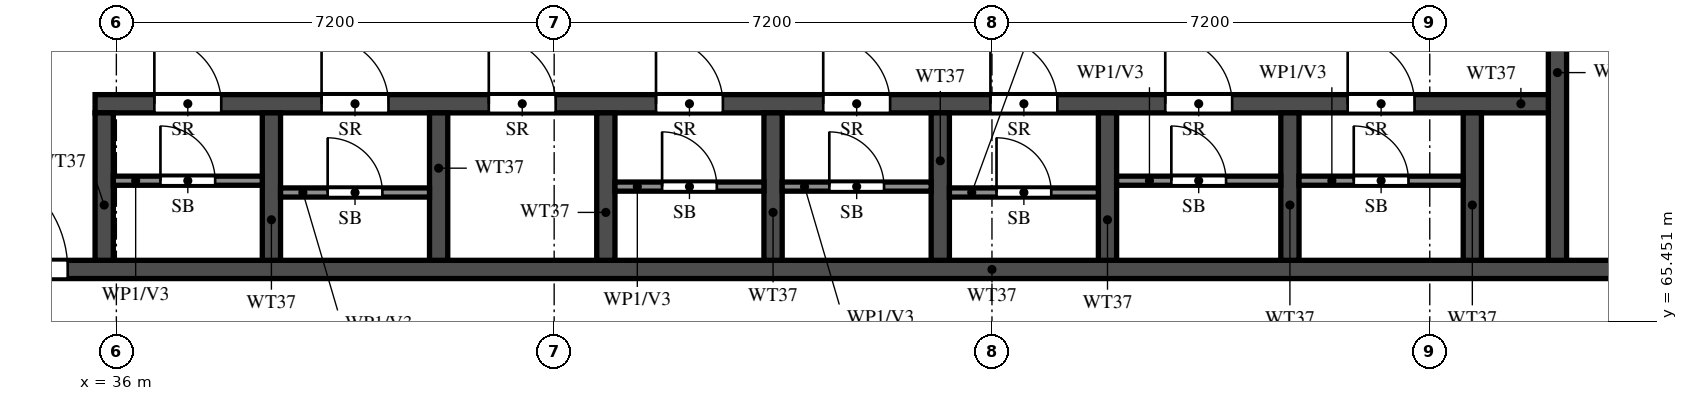
"""IFC4 building model, lengths in metres.
Left out: names, types, materials, properties, quantities, classifications, styles, units other than length and angle.
Written with IfcOpenShell. Run it as: python <this file> out.ifc"""

import sys

from ifc_helpers import new_model, si_unit, direction, frame, frame_2d, origin, place, context, subcontext, project, spatial, rectangle, extrude, element, fill, save


model = new_model("IFC4")
c1 = context("Model", 3, precision=1e-05, world=origin(), true_north=direction((0.0, 1.0)))
c2 = subcontext(c1, "Body", "Model", "MODEL_VIEW")
j1 = project(units=[si_unit("LENGTHUNIT", "METRE"), si_unit("PLANEANGLEUNIT", "RADIAN")], contexts=[c1])
p1 = place(None, origin())
s1 = spatial("IfcSite", under=j1, at=p1, CompositionType="ELEMENT")
p2 = place(p1, origin())
s2 = spatial("IfcBuilding", under=s1, at=p2, CompositionType="ELEMENT")
p3 = place(p2, frame((0.0, 0.0, 236.0)))
s3 = spatial("IfcBuildingStorey", under=s2, at=p3, CompositionType="ELEMENT", Elevation=236.0)
p4 = place(p3, frame((29.2, 66.3, 0.0), z_axis=(0.0, 0.0, 1.0), x_axis=(1.0, 0.0, 0.0)))
e1 = element("IfcWall", 1, at=p4, inside=s3, PredefinedType="SHEAR", context=c2, shape_type="SweptSolid", body=[
    extrude(rectangle(XDim=42.4, YDim=0.3, at=frame_2d((21.2, 0.0))), origin(), (0.0, 0.0, 1.0), 3.22),
])
p5 = place(p4, frame((1.425, 0.0, 0.0)))
e2 = element("IfcOpeningElement", 2, at=p5, cuts=e1, PredefinedType="OPENING", context=c2, shape_type="SweptSolid", body=[
    extrude(rectangle(XDim=1.1, YDim=2.1, at=frame_2d((0.55, 1.05))), frame((0.0, 0.16, 0.0), z_axis=(0.0, -1.0, 0.0), x_axis=(1.0, 0.0, 0.0)), (0.0, 0.0, 1.0), 0.32),
])
p6 = place(p4, frame((4.2, 0.0, 0.0)))
e3 = element("IfcOpeningElement", 3, at=p6, cuts=e1, PredefinedType="OPENING", context=c2, shape_type="SweptSolid", body=[
    extrude(rectangle(XDim=1.8, YDim=2.1, at=frame_2d((0.9, 1.05))), frame((0.0, 0.16, 0.0), z_axis=(0.0, -1.0, 0.0), x_axis=(1.0, 0.0, 0.0)), (0.0, 0.0, 1.0), 0.32),
])
p7 = place(p3, frame((35.65, 69.025, 0.0), z_axis=(0.0, 0.0, 1.0), x_axis=(1.0, 0.0, 0.0)))
e4 = element("IfcWall", 4, at=p7, inside=s3, PredefinedType="SHEAR", context=c2, shape_type="SweptSolid", body=[
    extrude(rectangle(XDim=24.05, YDim=0.3, at=frame_2d((12.025, 0.0))), origin(), (0.0, 0.0, 1.0), 3.22),
])
p8 = place(p7, frame((0.975, 0.0, 0.0)))
e5 = element("IfcOpeningElement", 5, at=p8, cuts=e4, PredefinedType="OPENING", context=c2, shape_type="SweptSolid", body=[
    extrude(rectangle(XDim=1.1, YDim=2.1, at=frame_2d((0.55, 1.05))), frame((0.0, 0.16, 0.0), z_axis=(0.0, -1.0, 0.0), x_axis=(1.0, 0.0, 0.0)), (0.0, 0.0, 1.0), 0.32),
])
p9 = place(p7, frame((3.725, 0.0, 0.0)))
e6 = element("IfcOpeningElement", 6, at=p9, cuts=e4, PredefinedType="OPENING", context=c2, shape_type="SweptSolid", body=[
    extrude(rectangle(XDim=1.1, YDim=2.1, at=frame_2d((0.55, 1.05))), frame((0.0, 0.16, 0.0), z_axis=(0.0, -1.0, 0.0), x_axis=(1.0, 0.0, 0.0)), (0.0, 0.0, 1.0), 0.32),
])
p10 = place(p7, frame((6.475, 0.0, 0.0)))
e7 = element("IfcOpeningElement", 7, at=p10, cuts=e4, PredefinedType="OPENING", context=c2, shape_type="SweptSolid", body=[
    extrude(rectangle(XDim=1.1, YDim=2.1, at=frame_2d((0.55, 1.05))), frame((0.0, 0.16, 0.0), z_axis=(0.0, -1.0, 0.0), x_axis=(1.0, 0.0, 0.0)), (0.0, 0.0, 1.0), 0.32),
])
p11 = place(p7, frame((9.225, 0.0, 0.0)))
e8 = element("IfcOpeningElement", 8, at=p11, cuts=e4, PredefinedType="OPENING", context=c2, shape_type="SweptSolid", body=[
    extrude(rectangle(XDim=1.1, YDim=2.1, at=frame_2d((0.55, 1.05))), frame((0.0, 0.16, 0.0), z_axis=(0.0, -1.0, 0.0), x_axis=(1.0, 0.0, 0.0)), (0.0, 0.0, 1.0), 0.32),
])
p12 = place(p7, frame((11.975, 0.0, 0.0)))
e9 = element("IfcOpeningElement", 9, at=p12, cuts=e4, PredefinedType="OPENING", context=c2, shape_type="SweptSolid", body=[
    extrude(rectangle(XDim=1.1, YDim=2.1, at=frame_2d((0.55, 1.05))), frame((0.0, 0.16, 0.0), z_axis=(0.0, -1.0, 0.0), x_axis=(1.0, 0.0, 0.0)), (0.0, 0.0, 1.0), 0.32),
])
p13 = place(p7, frame((14.725, 0.0, 0.0)))
e10 = element("IfcOpeningElement", 10, at=p13, cuts=e4, PredefinedType="OPENING", context=c2, shape_type="SweptSolid", body=[
    extrude(rectangle(XDim=1.1, YDim=2.1, at=frame_2d((0.55, 1.05))), frame((0.0, 0.16, 0.0), z_axis=(0.0, -1.0, 0.0), x_axis=(1.0, 0.0, 0.0)), (0.0, 0.0, 1.0), 0.32),
])
p14 = place(p7, frame((17.6, 0.0, 0.0)))
e11 = element("IfcOpeningElement", 11, at=p14, cuts=e4, PredefinedType="OPENING", context=c2, shape_type="SweptSolid", body=[
    extrude(rectangle(XDim=1.1, YDim=2.1, at=frame_2d((0.55, 1.05))), frame((0.0, 0.16, 0.0), z_axis=(0.0, -1.0, 0.0), x_axis=(1.0, 0.0, 0.0)), (0.0, 0.0, 1.0), 0.32),
])
p15 = place(p7, frame((20.6, 0.0, 0.0)))
e12 = element("IfcOpeningElement", 12, at=p15, cuts=e4, PredefinedType="OPENING", context=c2, shape_type="SweptSolid", body=[
    extrude(rectangle(XDim=1.1, YDim=2.1, at=frame_2d((0.55, 1.05))), frame((0.0, 0.16, 0.0), z_axis=(0.0, -1.0, 0.0), x_axis=(1.0, 0.0, 0.0)), (0.0, 0.0, 1.0), 0.32),
])
p16 = place(p3, frame((59.7, 66.45, 0.0), z_axis=(0.0, 0.0, 1.0), x_axis=(0.0, 1.0, 0.0)))
e13 = element("IfcWall", 13, at=p16, inside=s3, PredefinedType="SHEAR", context=c2, shape_type="SweptSolid", body=[
    extrude(rectangle(XDim=6.175, YDim=0.3, at=frame_2d((3.087, 0.0))), origin(), (0.0, 0.0, 1.0), 3.22),
])
p17 = place(p16, frame((3.85, 0.0, 0.0)))
e14 = element("IfcOpeningElement", 14, at=p17, cuts=e13, PredefinedType="OPENING", context=c2, shape_type="SweptSolid", body=[
    extrude(rectangle(XDim=1.2, YDim=2.1, at=frame_2d((0.6, 1.05))), frame((0.0, 0.16, 0.0), z_axis=(0.0, -1.0, 0.0), x_axis=(1.0, 0.0, 0.0)), (0.0, 0.0, 1.0), 0.32),
])
for number, where, z_axis, x_axis in (
    (15, (35.8, 66.45, 0.0), (0.0, 0.0, 1.0), (0.0, 1.0, 0.0)),
    (16, (38.55, 66.45, 0.0), (0.0, 0.0, 1.0), (0.0, 1.0, 0.0)),
    (17, (41.3, 66.45, 0.0), (0.0, 0.0, 1.0), (0.0, 1.0, 0.0)),
    (18, (44.05, 66.45, 0.0), (0.0, 0.0, 1.0), (0.0, 1.0, 0.0)),
    (19, (46.8, 66.45, 0.0), (0.0, 0.0, 1.0), (0.0, 1.0, 0.0)),
    (20, (49.55, 66.45, 0.0), (0.0, 0.0, 1.0), (0.0, 1.0, 0.0)),
    (21, (52.3, 66.45, 0.0), (0.0, 0.0, 1.0), (0.0, 1.0, 0.0)),
    (22, (55.3, 66.45, 0.0), (0.0, 0.0, 1.0), (0.0, 1.0, 0.0)),
    (23, (58.3, 66.45, 0.0), (0.0, 0.0, 1.0), (0.0, 1.0, 0.0)),
):
    element("IfcWall", number, at=place(p3, frame(where, z_axis=z_axis, x_axis=x_axis)), inside=s3, PredefinedType="SHEAR", context=c2, shape_type="SweptSolid", body=[
        extrude(rectangle(XDim=2.425, YDim=0.3, at=frame_2d((1.212, 0.0))), origin(), (0.0, 0.0, 1.0), 3.22),
    ])
p18 = place(p3, frame((35.95, 67.76, 0.0), z_axis=(0.0, 0.0, 1.0), x_axis=(1.0, 0.0, 0.0)))
e24 = element("IfcWall", 24, at=p18, inside=s3, PredefinedType="PARTITIONING", context=c2, shape_type="SweptSolid", body=[
    extrude(rectangle(XDim=2.45, YDim=0.15, at=frame_2d((1.225, 0.0))), origin(), (0.0, 0.0, 1.0), 3.22),
])
p19 = place(p18, frame((0.775, 0.0, 0.0)))
e25 = element("IfcOpeningElement", 25, at=p19, cuts=e24, PredefinedType="OPENING", context=c2, shape_type="SweptSolid", body=[
    extrude(rectangle(XDim=0.9, YDim=2.1, at=frame_2d((0.45, 1.05))), frame((0.0, 0.085, 0.0), z_axis=(0.0, -1.0, 0.0), x_axis=(1.0, 0.0, 0.0)), (0.0, 0.0, 1.0), 0.17),
])
p20 = place(p3, frame((38.7, 67.565, 0.0), z_axis=(0.0, 0.0, 1.0), x_axis=(1.0, 0.0, 0.0)))
e26 = element("IfcWall", 26, at=p20, inside=s3, PredefinedType="PARTITIONING", context=c2, shape_type="SweptSolid", body=[
    extrude(rectangle(XDim=2.45, YDim=0.15, at=frame_2d((1.225, 0.0))), origin(), (0.0, 0.0, 1.0), 3.22),
])
p21 = place(p20, frame((0.775, 0.0, 0.0)))
e27 = element("IfcOpeningElement", 27, at=p21, cuts=e26, PredefinedType="OPENING", context=c2, shape_type="SweptSolid", body=[
    extrude(rectangle(XDim=0.9, YDim=2.1, at=frame_2d((0.45, 1.05))), frame((0.0, 0.085, 0.0), z_axis=(0.0, -1.0, 0.0), x_axis=(1.0, 0.0, 0.0)), (0.0, 0.0, 1.0), 0.17),
])
p22 = place(p3, frame((44.2, 67.663, 0.0), z_axis=(0.0, 0.0, 1.0), x_axis=(1.0, 0.0, 0.0)))
e28 = element("IfcWall", 28, at=p22, inside=s3, PredefinedType="PARTITIONING", context=c2, shape_type="SweptSolid", body=[
    extrude(rectangle(XDim=2.45, YDim=0.15, at=frame_2d((1.225, 0.0))), origin(), (0.0, 0.0, 1.0), 3.22),
])
p23 = place(p22, frame((0.775, 0.0, 0.0)))
e29 = element("IfcOpeningElement", 29, at=p23, cuts=e28, PredefinedType="OPENING", context=c2, shape_type="SweptSolid", body=[
    extrude(rectangle(XDim=0.9, YDim=2.1, at=frame_2d((0.45, 1.05))), frame((0.0, 0.085, 0.0), z_axis=(0.0, -1.0, 0.0), x_axis=(1.0, 0.0, 0.0)), (0.0, 0.0, 1.0), 0.17),
])
p24 = place(p3, frame((46.95, 67.663, 0.0), z_axis=(0.0, 0.0, 1.0), x_axis=(1.0, 0.0, 0.0)))
e30 = element("IfcWall", 30, at=p24, inside=s3, PredefinedType="PARTITIONING", context=c2, shape_type="SweptSolid", body=[
    extrude(rectangle(XDim=2.45, YDim=0.15, at=frame_2d((1.225, 0.0))), origin(), (0.0, 0.0, 1.0), 3.22),
])
p25 = place(p24, frame((0.775, 0.0, 0.0)))
e31 = element("IfcOpeningElement", 31, at=p25, cuts=e30, PredefinedType="OPENING", context=c2, shape_type="SweptSolid", body=[
    extrude(rectangle(XDim=0.9, YDim=2.1, at=frame_2d((0.45, 1.05))), frame((0.0, 0.085, 0.0), z_axis=(0.0, -1.0, 0.0), x_axis=(1.0, 0.0, 0.0)), (0.0, 0.0, 1.0), 0.17),
])
p26 = place(p3, frame((49.7, 67.565, 0.0), z_axis=(0.0, 0.0, 1.0), x_axis=(1.0, 0.0, 0.0)))
e32 = element("IfcWall", 32, at=p26, inside=s3, PredefinedType="PARTITIONING", context=c2, shape_type="SweptSolid", body=[
    extrude(rectangle(XDim=2.45, YDim=0.15, at=frame_2d((1.225, 0.0))), origin(), (0.0, 0.0, 1.0), 3.22),
])
p27 = place(p26, frame((0.775, 0.0, 0.0)))
e33 = element("IfcOpeningElement", 33, at=p27, cuts=e32, PredefinedType="OPENING", context=c2, shape_type="SweptSolid", body=[
    extrude(rectangle(XDim=0.9, YDim=2.1, at=frame_2d((0.45, 1.05))), frame((0.0, 0.085, 0.0), z_axis=(0.0, -1.0, 0.0), x_axis=(1.0, 0.0, 0.0)), (0.0, 0.0, 1.0), 0.17),
])
p28 = place(p3, frame((52.45, 67.76, 0.0), z_axis=(0.0, 0.0, 1.0), x_axis=(1.0, 0.0, 0.0)))
e34 = element("IfcWall", 34, at=p28, inside=s3, PredefinedType="PARTITIONING", context=c2, shape_type="SweptSolid", body=[
    extrude(rectangle(XDim=2.7, YDim=0.15, at=frame_2d((1.35, 0.0))), origin(), (0.0, 0.0, 1.0), 3.22),
])
p29 = place(p28, frame((0.9, 0.0, 0.0)))
e35 = element("IfcOpeningElement", 35, at=p29, cuts=e34, PredefinedType="OPENING", context=c2, shape_type="SweptSolid", body=[
    extrude(rectangle(XDim=0.9, YDim=2.1, at=frame_2d((0.45, 1.05))), frame((0.0, 0.085, 0.0), z_axis=(0.0, -1.0, 0.0), x_axis=(1.0, 0.0, 0.0)), (0.0, 0.0, 1.0), 0.17),
])
p30 = place(p3, frame((55.45, 67.76, 0.0), z_axis=(0.0, 0.0, 1.0), x_axis=(1.0, 0.0, 0.0)))
e36 = element("IfcWall", 36, at=p30, inside=s3, PredefinedType="PARTITIONING", context=c2, shape_type="SweptSolid", body=[
    extrude(rectangle(XDim=2.7, YDim=0.15, at=frame_2d((1.35, 0.0))), origin(), (0.0, 0.0, 1.0), 3.22),
])
p31 = place(p30, frame((0.9, 0.0, 0.0)))
e37 = element("IfcOpeningElement", 37, at=p31, cuts=e36, PredefinedType="OPENING", context=c2, shape_type="SweptSolid", body=[
    extrude(rectangle(XDim=0.9, YDim=2.1, at=frame_2d((0.45, 1.05))), frame((0.0, 0.085, 0.0), z_axis=(0.0, -1.0, 0.0), x_axis=(1.0, 0.0, 0.0)), (0.0, 0.0, 1.0), 0.17),
])
p32 = place(p6, origin())
e38 = element("IfcDoor", 38, at=p32, inside=s3, OperationType="DOUBLE_DOOR_SINGLE_SWING", PredefinedType="DOOR", context=c2, shape_type="SweptSolid", body=[
    extrude(rectangle(XDim=1.8, YDim=2.1, at=frame_2d((0.9, 1.05))), frame((0.0, 0.025, 0.0), z_axis=(0.0, -1.0, 0.0), x_axis=(1.0, 0.0, 0.0)), (0.0, 0.0, 1.0), 0.05),
])
fill(e3, e38)
p33 = place(p8, origin())
e39 = element("IfcDoor", 39, at=p33, inside=s3, OperationType="SINGLE_SWING_RIGHT", PredefinedType="DOOR", context=c2, shape_type="SweptSolid", body=[
    extrude(rectangle(XDim=1.1, YDim=2.1, at=frame_2d((0.55, 1.05))), frame((0.0, 0.025, 0.0), z_axis=(0.0, -1.0, 0.0), x_axis=(1.0, 0.0, 0.0)), (0.0, 0.0, 1.0), 0.05),
])
fill(e5, e39)
p34 = place(p19, origin())
e40 = element("IfcDoor", 40, at=p34, inside=s3, OperationType="SINGLE_SWING_LEFT", PredefinedType="DOOR", context=c2, shape_type="SweptSolid", body=[
    extrude(rectangle(XDim=0.9, YDim=2.1, at=frame_2d((0.45, 1.05))), frame((0.0, 0.025, 0.0), z_axis=(0.0, -1.0, 0.0), x_axis=(1.0, 0.0, 0.0)), (0.0, 0.0, 1.0), 0.05),
])
fill(e25, e40)
p35 = place(p9, origin())
e41 = element("IfcDoor", 41, at=p35, inside=s3, OperationType="SINGLE_SWING_LEFT", PredefinedType="DOOR", context=c2, shape_type="SweptSolid", body=[
    extrude(rectangle(XDim=1.1, YDim=2.1, at=frame_2d((0.55, 1.05))), frame((0.0, 0.025, 0.0), z_axis=(0.0, -1.0, 0.0), x_axis=(1.0, 0.0, 0.0)), (0.0, 0.0, 1.0), 0.05),
])
fill(e6, e41)
p36 = place(p21, origin())
e42 = element("IfcDoor", 42, at=p36, inside=s3, OperationType="SINGLE_SWING_LEFT", PredefinedType="DOOR", context=c2, shape_type="SweptSolid", body=[
    extrude(rectangle(XDim=0.9, YDim=2.1, at=frame_2d((0.45, 1.05))), frame((0.0, 0.025, 0.0), z_axis=(0.0, -1.0, 0.0), x_axis=(1.0, 0.0, 0.0)), (0.0, 0.0, 1.0), 0.05),
])
fill(e27, e42)
p37 = place(p10, origin())
e43 = element("IfcDoor", 43, at=p37, inside=s3, OperationType="SINGLE_SWING_RIGHT", PredefinedType="DOOR", context=c2, shape_type="SweptSolid", body=[
    extrude(rectangle(XDim=1.1, YDim=2.1, at=frame_2d((0.55, 1.05))), frame((0.0, 0.025, 0.0), z_axis=(0.0, -1.0, 0.0), x_axis=(1.0, 0.0, 0.0)), (0.0, 0.0, 1.0), 0.05),
])
fill(e7, e43)
p38 = place(p11, origin())
e44 = element("IfcDoor", 44, at=p38, inside=s3, OperationType="SINGLE_SWING_LEFT", PredefinedType="DOOR", context=c2, shape_type="SweptSolid", body=[
    extrude(rectangle(XDim=1.1, YDim=2.1, at=frame_2d((0.55, 1.05))), frame((0.0, 0.025, 0.0), z_axis=(0.0, -1.0, 0.0), x_axis=(1.0, 0.0, 0.0)), (0.0, 0.0, 1.0), 0.05),
])
fill(e8, e44)
p39 = place(p23, origin())
e45 = element("IfcDoor", 45, at=p39, inside=s3, OperationType="SINGLE_SWING_LEFT", PredefinedType="DOOR", context=c2, shape_type="SweptSolid", body=[
    extrude(rectangle(XDim=0.9, YDim=2.1, at=frame_2d((0.45, 1.05))), frame((0.0, 0.025, 0.0), z_axis=(0.0, -1.0, 0.0), x_axis=(1.0, 0.0, 0.0)), (0.0, 0.0, 1.0), 0.05),
])
fill(e29, e45)
p40 = place(p12, origin())
e46 = element("IfcDoor", 46, at=p40, inside=s3, OperationType="SINGLE_SWING_RIGHT", PredefinedType="DOOR", context=c2, shape_type="SweptSolid", body=[
    extrude(rectangle(XDim=1.1, YDim=2.1, at=frame_2d((0.55, 1.05))), frame((0.0, 0.025, 0.0), z_axis=(0.0, -1.0, 0.0), x_axis=(1.0, 0.0, 0.0)), (0.0, 0.0, 1.0), 0.05),
])
fill(e9, e46)
p41 = place(p25, origin())
e47 = element("IfcDoor", 47, at=p41, inside=s3, OperationType="SINGLE_SWING_RIGHT", PredefinedType="DOOR", context=c2, shape_type="SweptSolid", body=[
    extrude(rectangle(XDim=0.9, YDim=2.1, at=frame_2d((0.45, 1.05))), frame((0.0, 0.025, 0.0), z_axis=(0.0, -1.0, 0.0), x_axis=(1.0, 0.0, 0.0)), (0.0, 0.0, 1.0), 0.05),
])
fill(e31, e47)
p42 = place(p13, origin())
e48 = element("IfcDoor", 48, at=p42, inside=s3, OperationType="SINGLE_SWING_LEFT", PredefinedType="DOOR", context=c2, shape_type="SweptSolid", body=[
    extrude(rectangle(XDim=1.1, YDim=2.1, at=frame_2d((0.55, 1.05))), frame((0.0, 0.025, 0.0), z_axis=(0.0, -1.0, 0.0), x_axis=(1.0, 0.0, 0.0)), (0.0, 0.0, 1.0), 0.05),
])
fill(e10, e48)
p43 = place(p27, origin())
e49 = element("IfcDoor", 49, at=p43, inside=s3, OperationType="SINGLE_SWING_LEFT", PredefinedType="DOOR", context=c2, shape_type="SweptSolid", body=[
    extrude(rectangle(XDim=0.9, YDim=2.1, at=frame_2d((0.45, 1.05))), frame((0.0, 0.025, 0.0), z_axis=(0.0, -1.0, 0.0), x_axis=(1.0, 0.0, 0.0)), (0.0, 0.0, 1.0), 0.05),
])
fill(e33, e49)
p44 = place(p14, origin())
e50 = element("IfcDoor", 50, at=p44, inside=s3, OperationType="SINGLE_SWING_RIGHT", PredefinedType="DOOR", context=c2, shape_type="SweptSolid", body=[
    extrude(rectangle(XDim=1.1, YDim=2.1, at=frame_2d((0.55, 1.05))), frame((0.0, 0.025, 0.0), z_axis=(0.0, -1.0, 0.0), x_axis=(1.0, 0.0, 0.0)), (0.0, 0.0, 1.0), 0.05),
])
fill(e11, e50)
p45 = place(p29, origin())
e51 = element("IfcDoor", 51, at=p45, inside=s3, OperationType="SINGLE_SWING_LEFT", PredefinedType="DOOR", context=c2, shape_type="SweptSolid", body=[
    extrude(rectangle(XDim=0.9, YDim=2.1, at=frame_2d((0.45, 1.05))), frame((0.0, 0.025, 0.0), z_axis=(0.0, -1.0, 0.0), x_axis=(1.0, 0.0, 0.0)), (0.0, 0.0, 1.0), 0.05),
])
fill(e35, e51)
p46 = place(p15, origin())
e52 = element("IfcDoor", 52, at=p46, inside=s3, OperationType="SINGLE_SWING_RIGHT", PredefinedType="DOOR", context=c2, shape_type="SweptSolid", body=[
    extrude(rectangle(XDim=1.1, YDim=2.1, at=frame_2d((0.55, 1.05))), frame((0.0, 0.025, 0.0), z_axis=(0.0, -1.0, 0.0), x_axis=(1.0, 0.0, 0.0)), (0.0, 0.0, 1.0), 0.05),
])
fill(e12, e52)
p47 = place(p31, origin())
e53 = element("IfcDoor", 53, at=p47, inside=s3, OperationType="SINGLE_SWING_LEFT", PredefinedType="DOOR", context=c2, shape_type="SweptSolid", body=[
    extrude(rectangle(XDim=0.9, YDim=2.1, at=frame_2d((0.45, 1.05))), frame((0.0, 0.025, 0.0), z_axis=(0.0, -1.0, 0.0), x_axis=(1.0, 0.0, 0.0)), (0.0, 0.0, 1.0), 0.05),
])
fill(e37, e53)
save(model, sys.argv[1])
